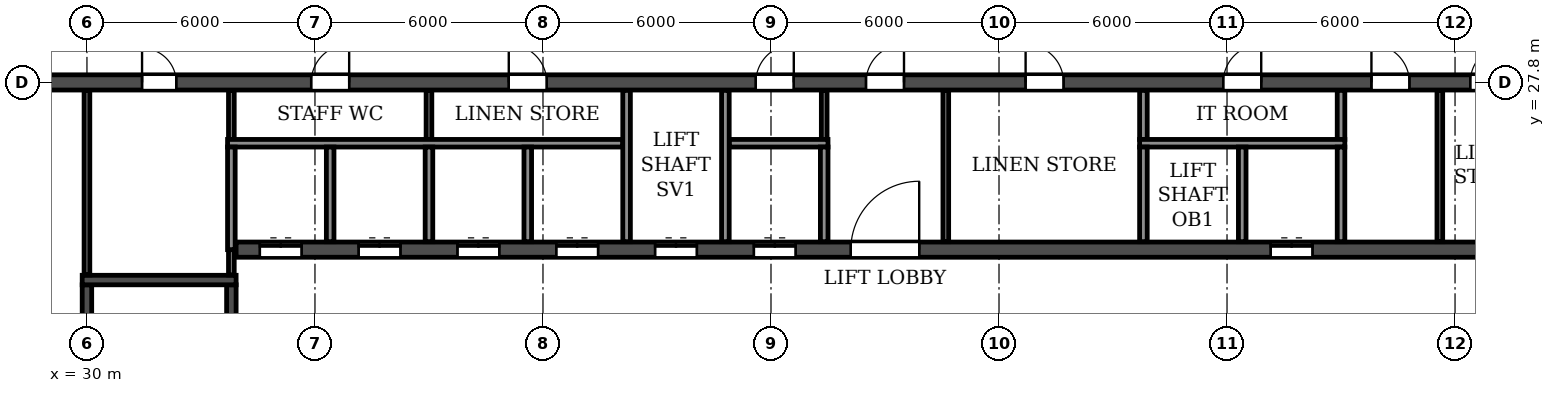
"""IFC4 building model, lengths in metres.
Left out: names, types, materials, properties, quantities, classifications, styles, units other than length and angle.
Written with IfcOpenShell. Run it as: python <this file> out.ifc"""

import sys

from ifc_helpers import new_model, si_unit, direction, frame, frame_2d, origin, place, context, subcontext, project, spatial, rectangle, extrude, element, fill, save


model = new_model("IFC4")
c1 = context("Model", 3, precision=1e-05, world=origin(), true_north=direction((0.0, 1.0)))
c2 = subcontext(c1, "Body", "Model", "MODEL_VIEW")
j1 = project(units=[si_unit("LENGTHUNIT", "METRE"), si_unit("PLANEANGLEUNIT", "RADIAN")], contexts=[c1])
p1 = place(None, origin())
s1 = spatial("IfcSite", under=j1, at=p1, CompositionType="ELEMENT")
p2 = place(p1, origin())
s2 = spatial("IfcBuilding", under=s1, at=p2, CompositionType="ELEMENT")
p3 = place(p2, frame((0.0, 0.0, 175.2)))
s3 = spatial("IfcBuildingStorey", under=s2, at=p3, CompositionType="ELEMENT", Elevation=175.2)
p4 = place(p3, frame((18.2, 27.8, 0.0), z_axis=(0.0, 0.0, 1.0), x_axis=(1.0, 0.0, 0.0)))
e1 = element("IfcWall", 1, at=p4, inside=s3, PredefinedType="SOLIDWALL", context=c2, shape_type="SweptSolid", body=[
    extrude(rectangle(XDim=65.6, YDim=0.4, at=frame_2d((32.8, 0.0))), origin(), (0.0, 0.0, 1.0), 3.08),
])
p5 = place(p4, frame((0.7, 0.0, 0.0)))
e2 = element("IfcOpeningElement", 2, at=p5, cuts=e1, PredefinedType="OPENING", context=c2, shape_type="SweptSolid", body=[
    extrude(rectangle(XDim=1.0, YDim=2.1, at=frame_2d((0.5, 1.05))), frame((0.0, 0.21, 0.0), z_axis=(0.0, -1.0, 0.0), x_axis=(1.0, 0.0, 0.0)), (0.0, 0.0, 1.0), 0.42),
])
p6 = place(p4, frame((4.05, 0.0, 0.0)))
e3 = element("IfcOpeningElement", 3, at=p6, cuts=e1, PredefinedType="OPENING", context=c2, shape_type="SweptSolid", body=[
    extrude(rectangle(XDim=0.9, YDim=2.1, at=frame_2d((0.45, 1.05))), frame((0.0, 0.21, 0.0), z_axis=(0.0, -1.0, 0.0), x_axis=(1.0, 0.0, 0.0)), (0.0, 0.0, 1.0), 0.42),
])
p7 = place(p4, frame((13.25, 0.0, 0.0)))
e4 = element("IfcOpeningElement", 4, at=p7, cuts=e1, PredefinedType="OPENING", context=c2, shape_type="SweptSolid", body=[
    extrude(rectangle(XDim=0.9, YDim=2.1, at=frame_2d((0.45, 1.05))), frame((0.0, 0.21, 0.0), z_axis=(0.0, -1.0, 0.0), x_axis=(1.0, 0.0, 0.0)), (0.0, 0.0, 1.0), 0.42),
])
p8 = place(p4, frame((17.7, 0.0, 0.0)))
e5 = element("IfcOpeningElement", 5, at=p8, cuts=e1, PredefinedType="OPENING", context=c2, shape_type="SweptSolid", body=[
    extrude(rectangle(XDim=1.0, YDim=2.1, at=frame_2d((0.5, 1.05))), frame((0.0, 0.21, 0.0), z_axis=(0.0, -1.0, 0.0), x_axis=(1.0, 0.0, 0.0)), (0.0, 0.0, 1.0), 0.42),
])
p9 = place(p4, frame((22.9, 0.0, 0.0)))
e6 = element("IfcOpeningElement", 6, at=p9, cuts=e1, PredefinedType="OPENING", context=c2, shape_type="SweptSolid", body=[
    extrude(rectangle(XDim=1.0, YDim=2.1, at=frame_2d((0.5, 1.05))), frame((0.0, 0.21, 0.0), z_axis=(0.0, -1.0, 0.0), x_axis=(1.0, 0.0, 0.0)), (0.0, 0.0, 1.0), 0.42),
])
p10 = place(p4, frame((29.4, 0.0, 0.0)))
e7 = element("IfcOpeningElement", 7, at=p10, cuts=e1, PredefinedType="OPENING", context=c2, shape_type="SweptSolid", body=[
    extrude(rectangle(XDim=1.0, YDim=2.1, at=frame_2d((0.5, 1.05))), frame((0.0, 0.21, 0.0), z_axis=(0.0, -1.0, 0.0), x_axis=(1.0, 0.0, 0.0)), (0.0, 0.0, 1.0), 0.42),
])
p11 = place(p4, frame((32.3, 0.0, 0.0)))
e8 = element("IfcOpeningElement", 8, at=p11, cuts=e1, PredefinedType="OPENING", context=c2, shape_type="SweptSolid", body=[
    extrude(rectangle(XDim=1.0, YDim=2.1, at=frame_2d((0.5, 1.05))), frame((0.0, 0.21, 0.0), z_axis=(0.0, -1.0, 0.0), x_axis=(1.0, 0.0, 0.0)), (0.0, 0.0, 1.0), 0.42),
])
p12 = place(p4, frame((36.5, 0.0, 0.0)))
e9 = element("IfcOpeningElement", 9, at=p12, cuts=e1, PredefinedType="OPENING", context=c2, shape_type="SweptSolid", body=[
    extrude(rectangle(XDim=1.0, YDim=2.1, at=frame_2d((0.5, 1.05))), frame((0.0, 0.21, 0.0), z_axis=(0.0, -1.0, 0.0), x_axis=(1.0, 0.0, 0.0)), (0.0, 0.0, 1.0), 0.42),
])
p13 = place(p4, frame((41.7, 0.0, 0.0)))
e10 = element("IfcOpeningElement", 10, at=p13, cuts=e1, PredefinedType="OPENING", context=c2, shape_type="SweptSolid", body=[
    extrude(rectangle(XDim=1.0, YDim=2.1, at=frame_2d((0.5, 1.05))), frame((0.0, 0.21, 0.0), z_axis=(0.0, -1.0, 0.0), x_axis=(1.0, 0.0, 0.0)), (0.0, 0.0, 1.0), 0.42),
])
p14 = place(p4, frame((45.6, 0.0, 0.0)))
e11 = element("IfcOpeningElement", 11, at=p14, cuts=e1, PredefinedType="OPENING", context=c2, shape_type="SweptSolid", body=[
    extrude(rectangle(XDim=1.0, YDim=2.1, at=frame_2d((0.5, 1.05))), frame((0.0, 0.21, 0.0), z_axis=(0.0, -1.0, 0.0), x_axis=(1.0, 0.0, 0.0)), (0.0, 0.0, 1.0), 0.42),
])
p15 = place(p4, frame((48.2, 0.0, 0.0)))
e12 = element("IfcOpeningElement", 12, at=p15, cuts=e1, PredefinedType="OPENING", context=c2, shape_type="SweptSolid", body=[
    extrude(rectangle(XDim=1.0, YDim=2.1, at=frame_2d((0.5, 1.05))), frame((0.0, 0.21, 0.0), z_axis=(0.0, -1.0, 0.0), x_axis=(1.0, 0.0, 0.0)), (0.0, 0.0, 1.0), 0.42),
])
p16 = place(p4, frame((51.45, 0.0, 0.0)))
e13 = element("IfcOpeningElement", 13, at=p16, cuts=e1, PredefinedType="OPENING", context=c2, shape_type="SweptSolid", body=[
    extrude(rectangle(XDim=0.9, YDim=2.1, at=frame_2d((0.45, 1.05))), frame((0.0, 0.21, 0.0), z_axis=(0.0, -1.0, 0.0), x_axis=(1.0, 0.0, 0.0)), (0.0, 0.0, 1.0), 0.42),
])
p17 = place(p4, frame((60.65, 0.0, 0.0)))
e14 = element("IfcOpeningElement", 14, at=p17, cuts=e1, PredefinedType="OPENING", context=c2, shape_type="SweptSolid", body=[
    extrude(rectangle(XDim=0.9, YDim=2.1, at=frame_2d((0.45, 1.05))), frame((0.0, 0.21, 0.0), z_axis=(0.0, -1.0, 0.0), x_axis=(1.0, 0.0, 0.0)), (0.0, 0.0, 1.0), 0.42),
])
p18 = place(p4, frame((63.9, 0.0, 0.0)))
e15 = element("IfcOpeningElement", 15, at=p18, cuts=e1, PredefinedType="OPENING", context=c2, shape_type="SweptSolid", body=[
    extrude(rectangle(XDim=1.0, YDim=2.1, at=frame_2d((0.5, 1.05))), frame((0.0, 0.21, 0.0), z_axis=(0.0, -1.0, 0.0), x_axis=(1.0, 0.0, 0.0)), (0.0, 0.0, 1.0), 0.42),
])
p19 = place(p3, frame((33.925, 23.4, 0.0), z_axis=(0.0, 0.0, 1.0), x_axis=(1.0, 0.0, 0.0)))
e16 = element("IfcWall", 16, at=p19, inside=s3, PredefinedType="SOLIDWALL", context=c2, shape_type="SweptSolid", body=[
    extrude(rectangle(XDim=34.15, YDim=0.4, at=frame_2d((17.075, 0.0))), origin(), (0.0, 0.0, 1.0), 3.08),
])
p20 = place(p19, frame((16.175, 0.0, 0.0)))
e17 = element("IfcOpeningElement", 17, at=p20, cuts=e16, PredefinedType="OPENING", context=c2, shape_type="SweptSolid", body=[
    extrude(rectangle(XDim=1.8, YDim=2.1, at=frame_2d((0.9, 1.05))), frame((0.0, 0.21, 0.0), z_axis=(0.0, -1.0, 0.0), x_axis=(1.0, 0.0, 0.0)), (0.0, 0.0, 1.0), 0.42),
])
p21 = place(p19, frame((0.625, 0.0, 0.0)))
e18 = element("IfcOpeningElement", 18, at=p21, cuts=e16, PredefinedType="OPENING", context=c2, shape_type="SweptSolid", body=[
    extrude(rectangle(XDim=1.1, YDim=2.1, at=frame_2d((0.55, 1.05))), frame((0.0, 0.21, 0.0), z_axis=(0.0, -1.0, 0.0), x_axis=(1.0, 0.0, 0.0)), (0.0, 0.0, 1.0), 0.42),
])
p22 = place(p19, frame((3.225, 0.0, 0.0)))
e19 = element("IfcOpeningElement", 19, at=p22, cuts=e16, PredefinedType="OPENING", context=c2, shape_type="SweptSolid", body=[
    extrude(rectangle(XDim=1.1, YDim=2.1, at=frame_2d((0.55, 1.05))), frame((0.0, 0.21, 0.0), z_axis=(0.0, -1.0, 0.0), x_axis=(1.0, 0.0, 0.0)), (0.0, 0.0, 1.0), 0.42),
])
p23 = place(p19, frame((5.825, 0.0, 0.0)))
e20 = element("IfcOpeningElement", 20, at=p23, cuts=e16, PredefinedType="OPENING", context=c2, shape_type="SweptSolid", body=[
    extrude(rectangle(XDim=1.1, YDim=2.1, at=frame_2d((0.55, 1.05))), frame((0.0, 0.21, 0.0), z_axis=(0.0, -1.0, 0.0), x_axis=(1.0, 0.0, 0.0)), (0.0, 0.0, 1.0), 0.42),
])
p24 = place(p19, frame((8.425, 0.0, 0.0)))
e21 = element("IfcOpeningElement", 21, at=p24, cuts=e16, PredefinedType="OPENING", context=c2, shape_type="SweptSolid", body=[
    extrude(rectangle(XDim=1.1, YDim=2.1, at=frame_2d((0.55, 1.05))), frame((0.0, 0.21, 0.0), z_axis=(0.0, -1.0, 0.0), x_axis=(1.0, 0.0, 0.0)), (0.0, 0.0, 1.0), 0.42),
])
p25 = place(p19, frame((11.025, 0.0, 0.0)))
e22 = element("IfcOpeningElement", 22, at=p25, cuts=e16, PredefinedType="OPENING", context=c2, shape_type="SweptSolid", body=[
    extrude(rectangle(XDim=1.1, YDim=2.1, at=frame_2d((0.55, 1.05))), frame((0.0, 0.21, 0.0), z_axis=(0.0, -1.0, 0.0), x_axis=(1.0, 0.0, 0.0)), (0.0, 0.0, 1.0), 0.42),
])
p26 = place(p19, frame((13.625, 0.0, 0.0)))
e23 = element("IfcOpeningElement", 23, at=p26, cuts=e16, PredefinedType="OPENING", context=c2, shape_type="SweptSolid", body=[
    extrude(rectangle(XDim=1.1, YDim=2.1, at=frame_2d((0.55, 1.05))), frame((0.0, 0.21, 0.0), z_axis=(0.0, -1.0, 0.0), x_axis=(1.0, 0.0, 0.0)), (0.0, 0.0, 1.0), 0.42),
])
p27 = place(p19, frame((27.225, 0.0, 0.0)))
e24 = element("IfcOpeningElement", 24, at=p27, cuts=e16, PredefinedType="OPENING", context=c2, shape_type="SweptSolid", body=[
    extrude(rectangle(XDim=1.1, YDim=2.1, at=frame_2d((0.55, 1.05))), frame((0.0, 0.21, 0.0), z_axis=(0.0, -1.0, 0.0), x_axis=(1.0, 0.0, 0.0)), (0.0, 0.0, 1.0), 0.42),
])
p28 = place(p3, frame((30.0, 14.8, 0.0), z_axis=(0.0, 0.0, 1.0), x_axis=(0.0, 1.0, 0.0)))
e25 = element("IfcWall", 25, at=p28, inside=s3, PredefinedType="SOLIDWALL", context=c2, shape_type="SweptSolid", body=[
    extrude(rectangle(XDim=7.675, YDim=0.25, at=frame_2d((3.837, 0.0))), origin(), (0.0, 0.0, 1.0), 3.08),
])
p29 = place(p3, frame((33.8, 14.8, 0.0), z_axis=(0.0, 0.0, 1.0), x_axis=(0.0, 1.0, 0.0)))
e26 = element("IfcWall", 26, at=p29, inside=s3, PredefinedType="SOLIDWALL", context=c2, shape_type="SweptSolid", body=[
    extrude(rectangle(XDim=7.675, YDim=0.25, at=frame_2d((3.837, 0.0))), origin(), (0.0, 0.0, 1.0), 3.08),
])
p30 = place(p29, frame((0.5, 0.0, 0.0)))
e27 = element("IfcOpeningElement", 27, at=p30, cuts=e26, PredefinedType="OPENING", context=c2, shape_type="SweptSolid", body=[
    extrude(rectangle(XDim=1.0, YDim=2.1, at=frame_2d((0.5, 1.05))), frame((0.0, 0.135, 0.0), z_axis=(0.0, -1.0, 0.0), x_axis=(1.0, 0.0, 0.0)), (0.0, 0.0, 1.0), 0.27),
])
p31 = place(p3, frame((29.875, 22.6, 0.0), z_axis=(0.0, 0.0, 1.0), x_axis=(1.0, 0.0, 0.0)))
e28 = element("IfcWall", 28, at=p31, inside=s3, PredefinedType="SOLIDWALL", context=c2, shape_type="SweptSolid", body=[
    extrude(rectangle(XDim=4.05, YDim=0.25, at=frame_2d((2.025, 0.0))), origin(), (0.0, 0.0, 1.0), 3.08),
])
p32 = place(p3, frame((49.4, 26.3, 0.0), z_axis=(0.0, 0.0, 1.0), x_axis=(0.0, 1.0, 0.0)))
e29 = element("IfcWall", 29, at=p32, inside=s3, PredefinedType="PARTITIONING", context=c2, shape_type="SweptSolid", body=[
    extrude(rectangle(XDim=1.29, YDim=0.15, at=frame_2d((0.645, 0.0))), origin(), (0.0, 0.0, 1.0), 3.08),
])
p33 = place(p3, frame((52.6, 23.61, 0.0), z_axis=(0.0, 0.0, 1.0), x_axis=(0.0, 1.0, 0.0)))
e30 = element("IfcWall", 30, at=p33, inside=s3, PredefinedType="PARTITIONING", context=c2, shape_type="SweptSolid", body=[
    extrude(rectangle(XDim=3.98, YDim=0.15, at=frame_2d((1.99, 0.0))), origin(), (0.0, 0.0, 1.0), 3.08),
])
p34 = place(p3, frame((39.0, 26.3, 0.0), z_axis=(0.0, 0.0, 1.0), x_axis=(0.0, 1.0, 0.0)))
e31 = element("IfcWall", 31, at=p34, inside=s3, PredefinedType="PARTITIONING", context=c2, shape_type="SweptSolid", body=[
    extrude(rectangle(XDim=1.29, YDim=0.15, at=frame_2d((0.645, 0.0))), origin(), (0.0, 0.0, 1.0), 3.08),
])
p35 = place(p3, frame((65.6, 23.61, 0.0), z_axis=(0.0, 0.0, 1.0), x_axis=(0.0, 1.0, 0.0)))
e32 = element("IfcWall", 32, at=p35, inside=s3, PredefinedType="PARTITIONING", context=c2, shape_type="SweptSolid", body=[
    extrude(rectangle(XDim=3.98, YDim=0.15, at=frame_2d((1.99, 0.0))), origin(), (0.0, 0.0, 1.0), 3.08),
])
for number, where, z_axis, x_axis in (
    (33, (57.8, 26.3, 0.0), (0.0, 0.0, 1.0), (0.0, 1.0, 0.0)),
    (34, (63.0, 26.3, 0.0), (0.0, 0.0, 1.0), (0.0, 1.0, 0.0)),
):
    element("IfcWall", number, at=place(p3, frame(where, z_axis=z_axis, x_axis=x_axis)), inside=s3, PredefinedType="PARTITIONING", context=c2, shape_type="SweptSolid", body=[
        extrude(rectangle(XDim=1.29, YDim=0.2, at=frame_2d((0.645, 0.0))), origin(), (0.0, 0.0, 1.0), 3.08),
    ])
p36 = place(p3, frame((30.0, 22.735, 0.0), z_axis=(0.0, 0.0, 1.0), x_axis=(0.0, 1.0, 0.0)))
e35 = element("IfcWall", 35, at=p36, inside=s3, PredefinedType="PARTITIONING", context=c2, shape_type="SweptSolid", body=[
    extrude(rectangle(XDim=4.855, YDim=0.15, at=frame_2d((2.427, 0.0))), origin(), (0.0, 0.0, 1.0), 3.08),
])
p37 = place(p3, frame((33.8, 22.735, 0.0), z_axis=(0.0, 0.0, 1.0), x_axis=(0.0, 1.0, 0.0)))
e36 = element("IfcWall", 36, at=p37, inside=s3, PredefinedType="PARTITIONING", context=c2, shape_type="SweptSolid", body=[
    extrude(rectangle(XDim=0.665, YDim=0.15, at=frame_2d((0.333, 0.0))), origin(), (0.0, 0.0, 1.0), 3.08),
])
p38 = place(p3, frame((33.8, 26.3, 0.0), z_axis=(0.0, 0.0, 1.0), x_axis=(0.0, 1.0, 0.0)))
e37 = element("IfcWall", 37, at=p38, inside=s3, PredefinedType="PARTITIONING", context=c2, shape_type="SweptSolid", body=[
    extrude(rectangle(XDim=1.29, YDim=0.15, at=frame_2d((0.645, 0.0))), origin(), (0.0, 0.0, 1.0), 3.08),
])
p39 = place(p3, frame((33.7, 26.2, 0.0), z_axis=(0.0, 0.0, 1.0), x_axis=(1.0, 0.0, 0.0)))
e38 = element("IfcWall", 38, at=p39, inside=s3, PredefinedType="PARTITIONING", context=c2, shape_type="SweptSolid", body=[
    extrude(rectangle(XDim=10.4, YDim=0.2, at=frame_2d((5.2, 0.0))), origin(), (0.0, 0.0, 1.0), 3.08),
])
p40 = place(p3, frame((46.9, 26.2, 0.0), z_axis=(0.0, 0.0, 1.0), x_axis=(1.0, 0.0, 0.0)))
e39 = element("IfcWall", 39, at=p40, inside=s3, PredefinedType="PARTITIONING", context=c2, shape_type="SweptSolid", body=[
    extrude(rectangle(XDim=2.6, YDim=0.2, at=frame_2d((1.3, 0.0))), origin(), (0.0, 0.0, 1.0), 3.08),
])
p41 = place(p3, frame((57.7, 26.2, 0.0), z_axis=(0.0, 0.0, 1.0), x_axis=(1.0, 0.0, 0.0)))
e40 = element("IfcWall", 40, at=p41, inside=s3, PredefinedType="PARTITIONING", context=c2, shape_type="SweptSolid", body=[
    extrude(rectangle(XDim=5.4, YDim=0.2, at=frame_2d((2.7, 0.0))), origin(), (0.0, 0.0, 1.0), 3.08),
])
p42 = place(p3, frame((33.8, 23.4, 0.0), z_axis=(0.0, 0.0, 1.0), x_axis=(0.0, 1.0, 0.0)))
e41 = element("IfcWall", 41, at=p42, inside=s3, PredefinedType="PARTITIONING", context=c2, shape_type="SweptSolid", body=[
    extrude(rectangle(XDim=2.7, YDim=0.2, at=frame_2d((1.35, 0.0))), origin(), (0.0, 0.0, 1.0), 3.08),
])
for number, where, z_axis, x_axis in (
    (42, (36.4, 23.61, 0.0), (0.0, 0.0, 1.0), (0.0, 1.0, 0.0)),
    (43, (39.0, 23.61, 0.0), (0.0, 0.0, 1.0), (0.0, 1.0, 0.0)),
    (44, (41.6, 23.61, 0.0), (0.0, 0.0, 1.0), (0.0, 1.0, 0.0)),
):
    element("IfcWall", number, at=place(p3, frame(where, z_axis=z_axis, x_axis=x_axis)), inside=s3, PredefinedType="PARTITIONING", context=c2, shape_type="SweptSolid", body=[
        extrude(rectangle(XDim=2.49, YDim=0.2, at=frame_2d((1.245, 0.0))), origin(), (0.0, 0.0, 1.0), 3.08),
    ])
for number, where, z_axis, x_axis in (
    (45, (44.2, 23.61, 0.0), (0.0, 0.0, 1.0), (0.0, 1.0, 0.0)),
    (46, (46.8, 23.61, 0.0), (0.0, 0.0, 1.0), (0.0, 1.0, 0.0)),
):
    element("IfcWall", number, at=place(p3, frame(where, z_axis=z_axis, x_axis=x_axis)), inside=s3, PredefinedType="PARTITIONING", context=c2, shape_type="SweptSolid", body=[
        extrude(rectangle(XDim=3.98, YDim=0.2, at=frame_2d((1.99, 0.0))), origin(), (0.0, 0.0, 1.0), 3.08),
    ])
for number, where, z_axis, x_axis in (
    (47, (49.4, 23.61, 0.0), (0.0, 0.0, 1.0), (0.0, 1.0, 0.0)),
    (48, (57.8, 23.61, 0.0), (0.0, 0.0, 1.0), (0.0, 1.0, 0.0)),
    (49, (60.4, 23.61, 0.0), (0.0, 0.0, 1.0), (0.0, 1.0, 0.0)),
    (50, (63.0, 23.61, 0.0), (0.0, 0.0, 1.0), (0.0, 1.0, 0.0)),
):
    element("IfcWall", number, at=place(p3, frame(where, z_axis=z_axis, x_axis=x_axis)), inside=s3, PredefinedType="PARTITIONING", context=c2, shape_type="SweptSolid", body=[
        extrude(rectangle(XDim=2.49, YDim=0.2, at=frame_2d((1.245, 0.0))), origin(), (0.0, 0.0, 1.0), 3.08),
    ])
p43 = place(p7, origin())
e51 = element("IfcDoor", 51, at=p43, inside=s3, OperationType="SINGLE_SWING_LEFT", PredefinedType="DOOR", context=c2, shape_type="SweptSolid", body=[
    extrude(rectangle(XDim=0.9, YDim=2.1, at=frame_2d((0.45, 1.05))), frame((0.0, 0.025, 0.0), z_axis=(0.0, -1.0, 0.0), x_axis=(1.0, 0.0, 0.0)), (0.0, 0.0, 1.0), 0.05),
])
fill(e4, e51)
p44 = place(p8, origin())
e52 = element("IfcDoor", 52, at=p44, inside=s3, OperationType="SINGLE_SWING_RIGHT", PredefinedType="DOOR", context=c2, shape_type="SweptSolid", body=[
    extrude(rectangle(XDim=1.0, YDim=2.1, at=frame_2d((0.5, 1.05))), frame((0.0, 0.025, 0.0), z_axis=(0.0, -1.0, 0.0), x_axis=(1.0, 0.0, 0.0)), (0.0, 0.0, 1.0), 0.05),
])
fill(e5, e52)
p45 = place(p9, origin())
e53 = element("IfcDoor", 53, at=p45, inside=s3, OperationType="SINGLE_SWING_LEFT", PredefinedType="DOOR", context=c2, shape_type="SweptSolid", body=[
    extrude(rectangle(XDim=1.0, YDim=2.1, at=frame_2d((0.5, 1.05))), frame((0.0, 0.025, 0.0), z_axis=(0.0, -1.0, 0.0), x_axis=(1.0, 0.0, 0.0)), (0.0, 0.0, 1.0), 0.05),
])
fill(e6, e53)
p46 = place(p10, origin())
e54 = element("IfcDoor", 54, at=p46, inside=s3, OperationType="SINGLE_SWING_RIGHT", PredefinedType="DOOR", context=c2, shape_type="SweptSolid", body=[
    extrude(rectangle(XDim=1.0, YDim=2.1, at=frame_2d((0.5, 1.05))), frame((0.0, 0.025, 0.0), z_axis=(0.0, -1.0, 0.0), x_axis=(1.0, 0.0, 0.0)), (0.0, 0.0, 1.0), 0.05),
])
fill(e7, e54)
p47 = place(p11, origin())
e55 = element("IfcDoor", 55, at=p47, inside=s3, OperationType="SINGLE_SWING_RIGHT", PredefinedType="DOOR", context=c2, shape_type="SweptSolid", body=[
    extrude(rectangle(XDim=1.0, YDim=2.1, at=frame_2d((0.5, 1.05))), frame((0.0, 0.025, 0.0), z_axis=(0.0, -1.0, 0.0), x_axis=(1.0, 0.0, 0.0)), (0.0, 0.0, 1.0), 0.05),
])
fill(e8, e55)
p48 = place(p12, origin())
e56 = element("IfcDoor", 56, at=p48, inside=s3, OperationType="SINGLE_SWING_LEFT", PredefinedType="DOOR", context=c2, shape_type="SweptSolid", body=[
    extrude(rectangle(XDim=1.0, YDim=2.1, at=frame_2d((0.5, 1.05))), frame((0.0, 0.025, 0.0), z_axis=(0.0, -1.0, 0.0), x_axis=(1.0, 0.0, 0.0)), (0.0, 0.0, 1.0), 0.05),
])
fill(e9, e56)
p49 = place(p13, origin())
e57 = element("IfcDoor", 57, at=p49, inside=s3, OperationType="SINGLE_SWING_RIGHT", PredefinedType="DOOR", context=c2, shape_type="SweptSolid", body=[
    extrude(rectangle(XDim=1.0, YDim=2.1, at=frame_2d((0.5, 1.05))), frame((0.0, 0.025, 0.0), z_axis=(0.0, -1.0, 0.0), x_axis=(1.0, 0.0, 0.0)), (0.0, 0.0, 1.0), 0.05),
])
fill(e10, e57)
p50 = place(p14, origin())
e58 = element("IfcDoor", 58, at=p50, inside=s3, OperationType="SINGLE_SWING_LEFT", PredefinedType="DOOR", context=c2, shape_type="SweptSolid", body=[
    extrude(rectangle(XDim=1.0, YDim=2.1, at=frame_2d((0.5, 1.05))), frame((0.0, 0.025, 0.0), z_axis=(0.0, -1.0, 0.0), x_axis=(1.0, 0.0, 0.0)), (0.0, 0.0, 1.0), 0.05),
])
fill(e11, e58)
p51 = place(p15, origin())
e59 = element("IfcDoor", 59, at=p51, inside=s3, OperationType="SINGLE_SWING_RIGHT", PredefinedType="DOOR", context=c2, shape_type="SweptSolid", body=[
    extrude(rectangle(XDim=1.0, YDim=2.1, at=frame_2d((0.5, 1.05))), frame((0.0, 0.025, 0.0), z_axis=(0.0, -1.0, 0.0), x_axis=(1.0, 0.0, 0.0)), (0.0, 0.0, 1.0), 0.05),
])
fill(e12, e59)
p52 = place(p20, origin())
e60 = element("IfcDoor", 60, at=p52, inside=s3, OperationType="DOUBLE_DOOR_SINGLE_SWING", PredefinedType="DOOR", context=c2, shape_type="SweptSolid", body=[
    extrude(rectangle(XDim=1.8, YDim=2.1, at=frame_2d((0.9, 1.05))), frame((0.0, 0.025, 0.0), z_axis=(0.0, -1.0, 0.0), x_axis=(1.0, 0.0, 0.0)), (0.0, 0.0, 1.0), 0.05),
])
fill(e17, e60)
p53 = place(p21, origin())
e61 = element("IfcDoor", 61, at=p53, inside=s3, OperationType="DOUBLE_DOOR_SLIDING", PredefinedType="DOOR", context=c2, shape_type="SweptSolid", body=[
    extrude(rectangle(XDim=1.1, YDim=2.1, at=frame_2d((0.55, 1.05))), frame((0.0, 0.025, 0.0), z_axis=(0.0, -1.0, 0.0), x_axis=(1.0, 0.0, 0.0)), (0.0, 0.0, 1.0), 0.05),
])
fill(e18, e61)
p54 = place(p22, origin())
e62 = element("IfcDoor", 62, at=p54, inside=s3, OperationType="DOUBLE_DOOR_SLIDING", PredefinedType="DOOR", context=c2, shape_type="SweptSolid", body=[
    extrude(rectangle(XDim=1.1, YDim=2.1, at=frame_2d((0.55, 1.05))), frame((0.0, 0.025, 0.0), z_axis=(0.0, -1.0, 0.0), x_axis=(1.0, 0.0, 0.0)), (0.0, 0.0, 1.0), 0.05),
])
fill(e19, e62)
p55 = place(p23, origin())
e63 = element("IfcDoor", 63, at=p55, inside=s3, OperationType="DOUBLE_DOOR_SLIDING", PredefinedType="DOOR", context=c2, shape_type="SweptSolid", body=[
    extrude(rectangle(XDim=1.1, YDim=2.1, at=frame_2d((0.55, 1.05))), frame((0.0, 0.025, 0.0), z_axis=(0.0, -1.0, 0.0), x_axis=(1.0, 0.0, 0.0)), (0.0, 0.0, 1.0), 0.05),
])
fill(e20, e63)
p56 = place(p24, origin())
e64 = element("IfcDoor", 64, at=p56, inside=s3, OperationType="DOUBLE_DOOR_SLIDING", PredefinedType="DOOR", context=c2, shape_type="SweptSolid", body=[
    extrude(rectangle(XDim=1.1, YDim=2.1, at=frame_2d((0.55, 1.05))), frame((0.0, 0.025, 0.0), z_axis=(0.0, -1.0, 0.0), x_axis=(1.0, 0.0, 0.0)), (0.0, 0.0, 1.0), 0.05),
])
fill(e21, e64)
p57 = place(p25, origin())
e65 = element("IfcDoor", 65, at=p57, inside=s3, OperationType="DOUBLE_DOOR_SLIDING", PredefinedType="DOOR", context=c2, shape_type="SweptSolid", body=[
    extrude(rectangle(XDim=1.1, YDim=2.1, at=frame_2d((0.55, 1.05))), frame((0.0, 0.025, 0.0), z_axis=(0.0, -1.0, 0.0), x_axis=(1.0, 0.0, 0.0)), (0.0, 0.0, 1.0), 0.05),
])
fill(e22, e65)
p58 = place(p26, origin())
e66 = element("IfcDoor", 66, at=p58, inside=s3, OperationType="DOUBLE_DOOR_SLIDING", PredefinedType="DOOR", context=c2, shape_type="SweptSolid", body=[
    extrude(rectangle(XDim=1.1, YDim=2.1, at=frame_2d((0.55, 1.05))), frame((0.0, 0.025, 0.0), z_axis=(0.0, -1.0, 0.0), x_axis=(1.0, 0.0, 0.0)), (0.0, 0.0, 1.0), 0.05),
])
fill(e23, e66)
p59 = place(p27, origin())
e67 = element("IfcDoor", 67, at=p59, inside=s3, OperationType="DOUBLE_DOOR_SLIDING", PredefinedType="DOOR", context=c2, shape_type="SweptSolid", body=[
    extrude(rectangle(XDim=1.1, YDim=2.1, at=frame_2d((0.55, 1.05))), frame((0.0, 0.025, 0.0), z_axis=(0.0, -1.0, 0.0), x_axis=(1.0, 0.0, 0.0)), (0.0, 0.0, 1.0), 0.05),
])
fill(e24, e67)
save(model, sys.argv[1])
